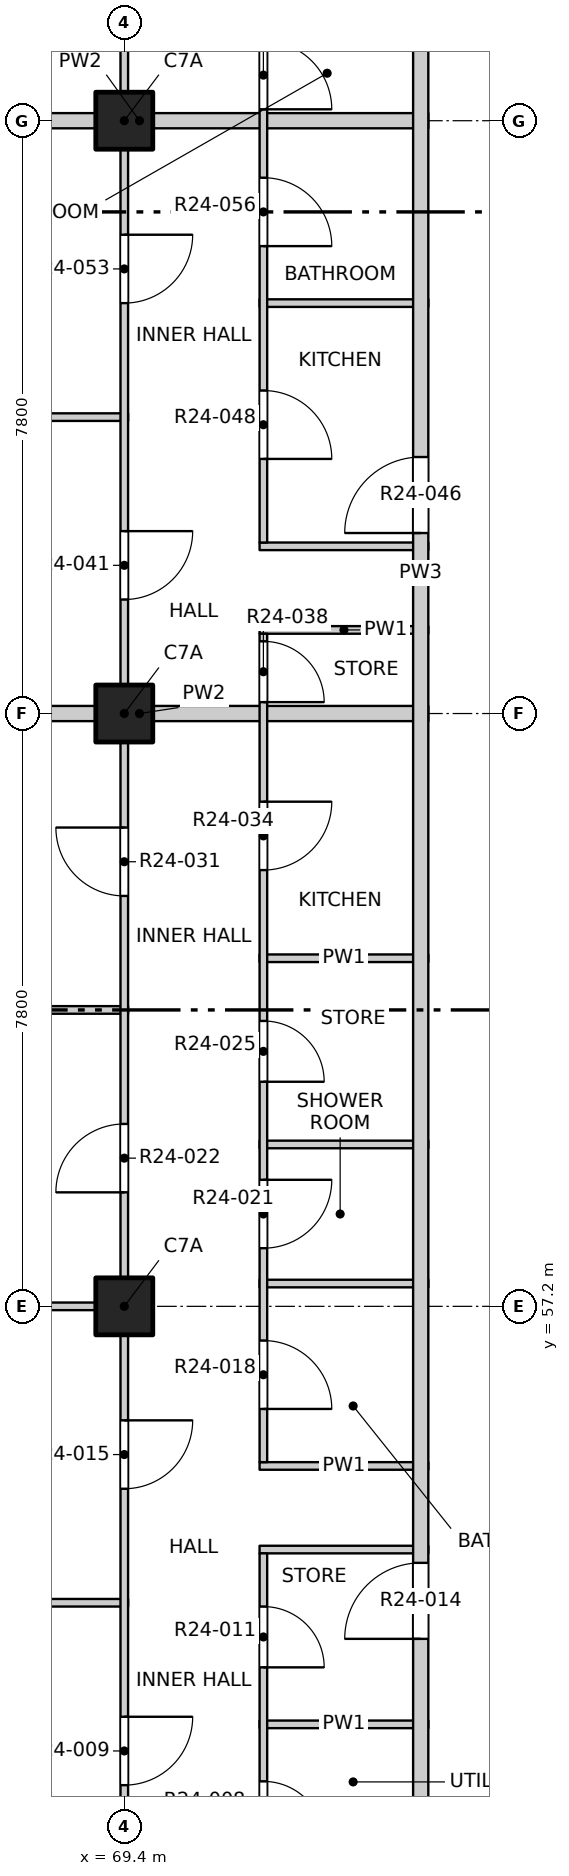
"""IFC4 building model, lengths in metres.
Left out: names, types, materials, properties, quantities, classifications, styles, units other than length and angle.
Written with IfcOpenShell. Run it as: python <this file> out.ifc"""

import sys

from ifc_helpers import new_model, si_unit, direction, frame, frame_2d, origin, origin_2d, place, context, subcontext, project, spatial, rectangle, extrude, element, fill, save


model = new_model("IFC4")
c1 = context("Model", 3, precision=1e-05, world=origin(), true_north=direction((0.0, 1.0)))
c2 = subcontext(c1, "Body", "Model", "MODEL_VIEW")
j1 = project(units=[si_unit("LENGTHUNIT", "METRE"), si_unit("PLANEANGLEUNIT", "RADIAN")], contexts=[c1])
p1 = place(None, origin())
s1 = spatial("IfcSite", under=j1, at=p1, CompositionType="ELEMENT")
p2 = place(p1, origin())
s2 = spatial("IfcBuilding", under=s1, at=p2, CompositionType="ELEMENT")
p3 = place(p2, frame((0.0, 0.0, 249.4)))
s3 = spatial("IfcBuildingStorey", under=s2, at=p3, CompositionType="ELEMENT", Elevation=249.4)
for number, where, z_axis, x_axis in (
    (1, (69.4, 57.2, -0.25), (0.0, 0.0, 1.0), (1.0, 0.0, 0.0)),
    (2, (69.4, 65.0, -0.25), (0.0, 0.0, 1.0), (1.0, 0.0, 0.0)),
    (3, (69.4, 72.8, -0.25), (0.0, 0.0, 1.0), (1.0, 0.0, 0.0)),
):
    element("IfcColumn", number, at=place(p3, frame(where, z_axis=z_axis, x_axis=x_axis)), inside=s3, PredefinedType="COLUMN", context=c2, shape_type="SweptSolid", body=[
        extrude(rectangle(XDim=0.75, YDim=0.75, at=origin_2d()), origin(), (0.0, 0.0, 1.0), 3.4),
    ])
p4 = place(p3, frame((71.18, 51.7, 0.0), z_axis=(0.0, 0.0, 1.0), x_axis=(1.0, 0.0, 0.0)))
e4 = element("IfcWall", 4, at=p4, inside=s3, PredefinedType="PARTITIONING", context=c2, shape_type="SweptSolid", body=[
    extrude(rectangle(XDim=2.22, YDim=0.1, at=frame_2d((1.11, 0.0))), origin(), (0.0, 0.0, 1.0), 3.15),
])
p5 = place(p3, frame((65.8, 53.3, 0.0), z_axis=(0.0, 0.0, 1.0), x_axis=(1.0, 0.0, 0.0)))
e5 = element("IfcWall", 5, at=p5, inside=s3, PredefinedType="PARTITIONING", context=c2, shape_type="SweptSolid", body=[
    extrude(rectangle(XDim=3.65, YDim=0.1, at=frame_2d((1.825, 0.0))), origin(), (0.0, 0.0, 1.0), 3.15),
])
for number, where, z_axis, x_axis in (
    (6, (71.18, 54.0, 0.0), (0.0, 0.0, 1.0), (1.0, 0.0, 0.0)),
    (7, (71.18, 55.1, 0.0), (0.0, 0.0, 1.0), (1.0, 0.0, 0.0)),
):
    element("IfcWall", number, at=place(p3, frame(where, z_axis=z_axis, x_axis=x_axis)), inside=s3, PredefinedType="PARTITIONING", context=c2, shape_type="SweptSolid", body=[
        extrude(rectangle(XDim=2.22, YDim=0.1, at=frame_2d((1.11, 0.0))), origin(), (0.0, 0.0, 1.0), 3.15),
    ])
p6 = place(p3, frame((65.8, 57.2, 0.0), z_axis=(0.0, 0.0, 1.0), x_axis=(1.0, 0.0, 0.0)))
e8 = element("IfcWall", 8, at=p6, inside=s3, PredefinedType="PARTITIONING", context=c2, shape_type="SweptSolid", body=[
    extrude(rectangle(XDim=3.65, YDim=0.1, at=frame_2d((1.825, 0.0))), origin(), (0.0, 0.0, 1.0), 3.15),
])
for number, where, z_axis, x_axis in (
    (9, (71.18, 57.5, 0.0), (0.0, 0.0, 1.0), (1.0, 0.0, 0.0)),
    (10, (71.18, 59.33, 0.0), (0.0, 0.0, 1.0), (1.0, 0.0, 0.0)),
):
    element("IfcWall", number, at=place(p3, frame(where, z_axis=z_axis, x_axis=x_axis)), inside=s3, PredefinedType="PARTITIONING", context=c2, shape_type="SweptSolid", body=[
        extrude(rectangle(XDim=2.22, YDim=0.1, at=frame_2d((1.11, 0.0))), origin(), (0.0, 0.0, 1.0), 3.15),
    ])
p7 = place(p3, frame((65.8, 61.1, 0.0), z_axis=(0.0, 0.0, 1.0), x_axis=(1.0, 0.0, 0.0)))
e11 = element("IfcWall", 11, at=p7, inside=s3, PredefinedType="PARTITIONING", context=c2, shape_type="SweptSolid", body=[
    extrude(rectangle(XDim=3.65, YDim=0.1, at=frame_2d((1.825, 0.0))), origin(), (0.0, 0.0, 1.0), 2.55),
])
p8 = place(p3, frame((71.18, 61.78, 0.0), z_axis=(0.0, 0.0, 1.0), x_axis=(1.0, 0.0, 0.0)))
e12 = element("IfcWall", 12, at=p8, inside=s3, PredefinedType="PARTITIONING", context=c2, shape_type="SweptSolid", body=[
    extrude(rectangle(XDim=2.22, YDim=0.1, at=frame_2d((1.11, 0.0))), origin(), (0.0, 0.0, 1.0), 3.15),
])
p9 = place(p3, frame((65.8, 65.0, 0.0), z_axis=(0.0, 0.0, 1.0), x_axis=(1.0, 0.0, 0.0)))
e13 = element("IfcWall", 13, at=p9, inside=s3, PredefinedType="PARTITIONING", context=c2, shape_type="SweptSolid", body=[
    extrude(rectangle(XDim=7.6, YDim=0.2, at=frame_2d((3.8, 0.0))), origin(), (0.0, 0.0, 1.0), 3.15),
])
for number, where, z_axis, x_axis in (
    (14, (71.18, 66.1, 0.0), (0.0, 0.0, 1.0), (1.0, 0.0, 0.0)),
    (15, (71.18, 67.2, 0.0), (0.0, 0.0, 1.0), (1.0, 0.0, 0.0)),
):
    element("IfcWall", number, at=place(p3, frame(where, z_axis=z_axis, x_axis=x_axis)), inside=s3, PredefinedType="PARTITIONING", context=c2, shape_type="SweptSolid", body=[
        extrude(rectangle(XDim=2.22, YDim=0.1, at=frame_2d((1.11, 0.0))), origin(), (0.0, 0.0, 1.0), 3.15),
    ])
p10 = place(p3, frame((65.8, 68.9, 0.0), z_axis=(0.0, 0.0, 1.0), x_axis=(1.0, 0.0, 0.0)))
e16 = element("IfcWall", 16, at=p10, inside=s3, PredefinedType="PARTITIONING", context=c2, shape_type="SweptSolid", body=[
    extrude(rectangle(XDim=3.65, YDim=0.1, at=frame_2d((1.825, 0.0))), origin(), (0.0, 0.0, 1.0), 2.55),
])
p11 = place(p3, frame((71.18, 70.4, 0.0), z_axis=(0.0, 0.0, 1.0), x_axis=(1.0, 0.0, 0.0)))
e17 = element("IfcWall", 17, at=p11, inside=s3, PredefinedType="PARTITIONING", context=c2, shape_type="SweptSolid", body=[
    extrude(rectangle(XDim=2.22, YDim=0.1, at=frame_2d((1.11, 0.0))), origin(), (0.0, 0.0, 1.0), 3.15),
])
p12 = place(p3, frame((65.8, 72.8, 0.0), z_axis=(0.0, 0.0, 1.0), x_axis=(1.0, 0.0, 0.0)))
e18 = element("IfcWall", 18, at=p12, inside=s3, PredefinedType="PARTITIONING", context=c2, shape_type="SweptSolid", body=[
    extrude(rectangle(XDim=7.6, YDim=0.2, at=frame_2d((3.8, 0.0))), origin(), (0.0, 0.0, 1.0), 3.15),
])
p13 = place(p3, frame((69.4, 45.8, 0.0), z_axis=(0.0, 0.0, 1.0), x_axis=(0.0, 1.0, 0.0)))
e19 = element("IfcWall", 19, at=p13, inside=s3, PredefinedType="PARTITIONING", context=c2, shape_type="SweptSolid", body=[
    extrude(rectangle(XDim=38.4, YDim=0.1, at=frame_2d((19.2, 0.0))), origin(), (0.0, 0.0, 1.0), 3.15),
])
p14 = place(p13, frame((1.05, 0.0, 0.0)))
e20 = element("IfcOpeningElement", 20, at=p14, cuts=e19, PredefinedType="OPENING", context=c2, shape_type="SweptSolid", body=[
    extrude(rectangle(XDim=1.2, YDim=2.1, at=frame_2d((0.6, 1.05))), frame((0.0, 0.06, 0.0), z_axis=(0.0, -1.0, 0.0), x_axis=(1.0, 0.0, 0.0)), (0.0, 0.0, 1.0), 0.12),
])
p15 = place(p13, frame((5.1, 0.0, 0.0)))
e21 = element("IfcOpeningElement", 21, at=p15, cuts=e19, PredefinedType="OPENING", context=c2, shape_type="SweptSolid", body=[
    extrude(rectangle(XDim=0.9, YDim=2.1, at=frame_2d((0.45, 1.05))), frame((0.0, 0.06, 0.0), z_axis=(0.0, -1.0, 0.0), x_axis=(1.0, 0.0, 0.0)), (0.0, 0.0, 1.0), 0.12),
])
p16 = place(p13, frame((9.0, 0.0, 0.0)))
e22 = element("IfcOpeningElement", 22, at=p16, cuts=e19, PredefinedType="OPENING", context=c2, shape_type="SweptSolid", body=[
    extrude(rectangle(XDim=0.9, YDim=2.1, at=frame_2d((0.45, 1.05))), frame((0.0, 0.06, 0.0), z_axis=(0.0, -1.0, 0.0), x_axis=(1.0, 0.0, 0.0)), (0.0, 0.0, 1.0), 0.12),
])
p17 = place(p13, frame((12.9, 0.0, 0.0)))
e23 = element("IfcOpeningElement", 23, at=p17, cuts=e19, PredefinedType="OPENING", context=c2, shape_type="SweptSolid", body=[
    extrude(rectangle(XDim=0.9, YDim=2.1, at=frame_2d((0.45, 1.05))), frame((0.0, 0.06, 0.0), z_axis=(0.0, -1.0, 0.0), x_axis=(1.0, 0.0, 0.0)), (0.0, 0.0, 1.0), 0.12),
])
p18 = place(p13, frame((16.8, 0.0, 0.0)))
e24 = element("IfcOpeningElement", 24, at=p18, cuts=e19, PredefinedType="OPENING", context=c2, shape_type="SweptSolid", body=[
    extrude(rectangle(XDim=0.9, YDim=2.1, at=frame_2d((0.45, 1.05))), frame((0.0, 0.06, 0.0), z_axis=(0.0, -1.0, 0.0), x_axis=(1.0, 0.0, 0.0)), (0.0, 0.0, 1.0), 0.12),
])
p19 = place(p13, frame((20.7, 0.0, 0.0)))
e25 = element("IfcOpeningElement", 25, at=p19, cuts=e19, PredefinedType="OPENING", context=c2, shape_type="SweptSolid", body=[
    extrude(rectangle(XDim=0.9, YDim=2.1, at=frame_2d((0.45, 1.05))), frame((0.0, 0.06, 0.0), z_axis=(0.0, -1.0, 0.0), x_axis=(1.0, 0.0, 0.0)), (0.0, 0.0, 1.0), 0.12),
])
p20 = place(p13, frame((24.6, 0.0, 0.0)))
e26 = element("IfcOpeningElement", 26, at=p20, cuts=e19, PredefinedType="OPENING", context=c2, shape_type="SweptSolid", body=[
    extrude(rectangle(XDim=0.9, YDim=2.1, at=frame_2d((0.45, 1.05))), frame((0.0, 0.06, 0.0), z_axis=(0.0, -1.0, 0.0), x_axis=(1.0, 0.0, 0.0)), (0.0, 0.0, 1.0), 0.12),
])
p21 = place(p13, frame((30.3, 0.0, 0.0)))
e27 = element("IfcOpeningElement", 27, at=p21, cuts=e19, PredefinedType="OPENING", context=c2, shape_type="SweptSolid", body=[
    extrude(rectangle(XDim=1.2, YDim=2.1, at=frame_2d((0.6, 1.05))), frame((0.0, 0.06, 0.0), z_axis=(0.0, -1.0, 0.0), x_axis=(1.0, 0.0, 0.0)), (0.0, 0.0, 1.0), 0.12),
])
p22 = place(p13, frame((36.15, 0.0, 0.0)))
e28 = element("IfcOpeningElement", 28, at=p22, cuts=e19, PredefinedType="OPENING", context=c2, shape_type="SweptSolid", body=[
    extrude(rectangle(XDim=1.2, YDim=2.1, at=frame_2d((0.6, 1.05))), frame((0.0, 0.06, 0.0), z_axis=(0.0, -1.0, 0.0), x_axis=(1.0, 0.0, 0.0)), (0.0, 0.0, 1.0), 0.12),
])
p23 = place(p3, frame((71.23, 49.45, 0.0), z_axis=(0.0, 0.0, 1.0), x_axis=(0.0, 1.0, 0.0)))
e29 = element("IfcWall", 29, at=p23, inside=s3, PredefinedType="PARTITIONING", context=c2, shape_type="SweptSolid", body=[
    extrude(rectangle(XDim=4.5, YDim=0.1, at=frame_2d((2.25, 0.0))), origin(), (0.0, 0.0, 1.0), 3.15),
])
p24 = place(p23, frame((0.7, 0.0, 0.0)))
e30 = element("IfcOpeningElement", 30, at=p24, cuts=e29, PredefinedType="OPENING", context=c2, shape_type="SweptSolid", body=[
    extrude(rectangle(XDim=0.8, YDim=2.1, at=frame_2d((0.4, 1.05))), frame((0.0, 0.06, 0.0), z_axis=(0.0, -1.0, 0.0), x_axis=(1.0, 0.0, 0.0)), (0.0, 0.0, 1.0), 0.12),
])
p25 = place(p23, frame((3.0, 0.0, 0.0)))
e31 = element("IfcOpeningElement", 31, at=p25, cuts=e29, PredefinedType="OPENING", context=c2, shape_type="SweptSolid", body=[
    extrude(rectangle(XDim=0.8, YDim=2.1, at=frame_2d((0.4, 1.05))), frame((0.0, 0.06, 0.0), z_axis=(0.0, -1.0, 0.0), x_axis=(1.0, 0.0, 0.0)), (0.0, 0.0, 1.0), 0.12),
])
p26 = place(p3, frame((71.23, 55.15, 0.0), z_axis=(0.0, 0.0, 1.0), x_axis=(0.0, 1.0, 0.0)))
e32 = element("IfcWall", 32, at=p26, inside=s3, PredefinedType="PARTITIONING", context=c2, shape_type="SweptSolid", body=[
    extrude(rectangle(XDim=10.9, YDim=0.1, at=frame_2d((5.45, 0.0))), origin(), (0.0, 0.0, 1.0), 3.15),
])
p27 = place(p26, frame((0.7, 0.0, 0.0)))
e33 = element("IfcOpeningElement", 33, at=p27, cuts=e32, PredefinedType="OPENING", context=c2, shape_type="SweptSolid", body=[
    extrude(rectangle(XDim=0.9, YDim=2.1, at=frame_2d((0.45, 1.05))), frame((0.0, 0.06, 0.0), z_axis=(0.0, -1.0, 0.0), x_axis=(1.0, 0.0, 0.0)), (0.0, 0.0, 1.0), 0.12),
])
p28 = place(p26, frame((2.815, 0.0, 0.0)))
e34 = element("IfcOpeningElement", 34, at=p28, cuts=e32, PredefinedType="OPENING", context=c2, shape_type="SweptSolid", body=[
    extrude(rectangle(XDim=0.9, YDim=2.1, at=frame_2d((0.45, 1.05))), frame((0.0, 0.06, 0.0), z_axis=(0.0, -1.0, 0.0), x_axis=(1.0, 0.0, 0.0)), (0.0, 0.0, 1.0), 0.12),
])
p29 = place(p26, frame((5.005, 0.0, 0.0)))
e35 = element("IfcOpeningElement", 35, at=p29, cuts=e32, PredefinedType="OPENING", context=c2, shape_type="SweptSolid", body=[
    extrude(rectangle(XDim=0.8, YDim=2.1, at=frame_2d((0.4, 1.05))), frame((0.0, 0.06, 0.0), z_axis=(0.0, -1.0, 0.0), x_axis=(1.0, 0.0, 0.0)), (0.0, 0.0, 1.0), 0.12),
])
p30 = place(p26, frame((7.79, 0.0, 0.0)))
e36 = element("IfcOpeningElement", 36, at=p30, cuts=e32, PredefinedType="OPENING", context=c2, shape_type="SweptSolid", body=[
    extrude(rectangle(XDim=0.9, YDim=2.1, at=frame_2d((0.45, 1.05))), frame((0.0, 0.06, 0.0), z_axis=(0.0, -1.0, 0.0), x_axis=(1.0, 0.0, 0.0)), (0.0, 0.0, 1.0), 0.12),
])
p31 = place(p26, frame((10.0, 0.0, 0.0)))
e37 = element("IfcOpeningElement", 37, at=p31, cuts=e32, PredefinedType="OPENING", context=c2, shape_type="SweptSolid", body=[
    extrude(rectangle(XDim=0.8, YDim=2.1, at=frame_2d((0.4, 1.05))), frame((0.0, 0.06, 0.0), z_axis=(0.0, -1.0, 0.0), x_axis=(1.0, 0.0, 0.0)), (0.0, 0.0, 1.0), 0.12),
])
p32 = place(p3, frame((71.23, 67.25, 0.0), z_axis=(0.0, 0.0, 1.0), x_axis=(0.0, 1.0, 0.0)))
e38 = element("IfcWall", 38, at=p32, inside=s3, PredefinedType="PARTITIONING", context=c2, shape_type="SweptSolid", body=[
    extrude(rectangle(XDim=6.7, YDim=0.1, at=frame_2d((3.35, 0.0))), origin(), (0.0, 0.0, 1.0), 3.15),
])
p33 = place(p32, frame((1.1, 0.0, 0.0)))
e39 = element("IfcOpeningElement", 39, at=p33, cuts=e38, PredefinedType="OPENING", context=c2, shape_type="SweptSolid", body=[
    extrude(rectangle(XDim=0.9, YDim=2.1, at=frame_2d((0.45, 1.05))), frame((0.0, 0.06, 0.0), z_axis=(0.0, -1.0, 0.0), x_axis=(1.0, 0.0, 0.0)), (0.0, 0.0, 1.0), 0.12),
])
p34 = place(p32, frame((3.9, 0.0, 0.0)))
e40 = element("IfcOpeningElement", 40, at=p34, cuts=e38, PredefinedType="OPENING", context=c2, shape_type="SweptSolid", body=[
    extrude(rectangle(XDim=0.9, YDim=2.1, at=frame_2d((0.45, 1.05))), frame((0.0, 0.06, 0.0), z_axis=(0.0, -1.0, 0.0), x_axis=(1.0, 0.0, 0.0)), (0.0, 0.0, 1.0), 0.12),
])
p35 = place(p32, frame((5.7, 0.0, 0.0)))
e41 = element("IfcOpeningElement", 41, at=p35, cuts=e38, PredefinedType="OPENING", context=c2, shape_type="SweptSolid", body=[
    extrude(rectangle(XDim=0.9, YDim=2.1, at=frame_2d((0.45, 1.05))), frame((0.0, 0.06, 0.0), z_axis=(0.0, -1.0, 0.0), x_axis=(1.0, 0.0, 0.0)), (0.0, 0.0, 1.0), 0.12),
])
p36 = place(p3, frame((73.3, 49.5, 0.0), z_axis=(0.0, 0.0, 1.0), x_axis=(0.0, 1.0, 0.0)))
e42 = element("IfcWall", 42, at=p36, inside=s3, PredefinedType="PARTITIONING", context=c2, shape_type="SweptSolid", body=[
    extrude(rectangle(XDim=34.7, YDim=0.2, at=frame_2d((17.35, 0.0))), origin(), (0.0, 0.0, 1.0), 3.15),
])
p37 = place(p36, frame((3.325, 0.0, 0.0)))
e43 = element("IfcOpeningElement", 43, at=p37, cuts=e42, PredefinedType="OPENING", context=c2, shape_type="SweptSolid", body=[
    extrude(rectangle(XDim=1.0, YDim=2.1, at=frame_2d((0.5, 1.05))), frame((0.0, 0.11, 0.0), z_axis=(0.0, -1.0, 0.0), x_axis=(1.0, 0.0, 0.0)), (0.0, 0.0, 1.0), 0.22),
])
p38 = place(p36, frame((17.875, 0.0, 0.0)))
e44 = element("IfcOpeningElement", 44, at=p38, cuts=e42, PredefinedType="OPENING", context=c2, shape_type="SweptSolid", body=[
    extrude(rectangle(XDim=1.0, YDim=2.1, at=frame_2d((0.5, 1.05))), frame((0.0, 0.11, 0.0), z_axis=(0.0, -1.0, 0.0), x_axis=(1.0, 0.0, 0.0)), (0.0, 0.0, 1.0), 0.22),
])
p39 = place(p36, frame((25.775, 0.0, 0.0)))
e45 = element("IfcOpeningElement", 45, at=p39, cuts=e42, PredefinedType="OPENING", context=c2, shape_type="SweptSolid", body=[
    extrude(rectangle(XDim=1.0, YDim=2.1, at=frame_2d((0.5, 1.05))), frame((0.0, 0.11, 0.0), z_axis=(0.0, -1.0, 0.0), x_axis=(1.0, 0.0, 0.0)), (0.0, 0.0, 1.0), 0.22),
])
p40 = place(p24, origin())
e46 = element("IfcDoor", 46, at=p40, inside=s3, OperationType="SINGLE_SWING_RIGHT", PredefinedType="DOOR", context=c2, shape_type="SweptSolid", body=[
    extrude(rectangle(XDim=0.8, YDim=2.1, at=frame_2d((0.4, 1.05))), frame((0.0, 0.025, 0.0), z_axis=(0.0, -1.0, 0.0), x_axis=(1.0, 0.0, 0.0)), (0.0, 0.0, 1.0), 0.05),
])
fill(e30, e46)
p41 = place(p15, origin())
e47 = element("IfcDoor", 47, at=p41, inside=s3, OperationType="SINGLE_SWING_LEFT", PredefinedType="DOOR", context=c2, shape_type="SweptSolid", body=[
    extrude(rectangle(XDim=0.9, YDim=2.1, at=frame_2d((0.45, 1.05))), frame((0.0, 0.025, 0.0), z_axis=(0.0, -1.0, 0.0), x_axis=(1.0, 0.0, 0.0)), (0.0, 0.0, 1.0), 0.05),
])
fill(e21, e47)
p42 = place(p25, origin())
e48 = element("IfcDoor", 48, at=p42, inside=s3, OperationType="SINGLE_SWING_RIGHT", PredefinedType="DOOR", context=c2, shape_type="SweptSolid", body=[
    extrude(rectangle(XDim=0.8, YDim=2.1, at=frame_2d((0.4, 1.05))), frame((0.0, 0.025, 0.0), z_axis=(0.0, -1.0, 0.0), x_axis=(1.0, 0.0, 0.0)), (0.0, 0.0, 1.0), 0.05),
])
fill(e31, e48)
p43 = place(p37, origin())
e49 = element("IfcDoor", 49, at=p43, inside=s3, OperationType="SINGLE_SWING_LEFT", PredefinedType="DOOR", context=c2, shape_type="SweptSolid", body=[
    extrude(rectangle(XDim=1.0, YDim=2.1, at=frame_2d((0.5, 1.05))), frame((0.0, 0.025, 0.0), z_axis=(0.0, -1.0, 0.0), x_axis=(1.0, 0.0, 0.0)), (0.0, 0.0, 1.0), 0.05),
])
fill(e43, e49)
p44 = place(p16, origin())
e50 = element("IfcDoor", 50, at=p44, inside=s3, OperationType="SINGLE_SWING_LEFT", PredefinedType="DOOR", context=c2, shape_type="SweptSolid", body=[
    extrude(rectangle(XDim=0.9, YDim=2.1, at=frame_2d((0.45, 1.05))), frame((0.0, 0.025, 0.0), z_axis=(0.0, -1.0, 0.0), x_axis=(1.0, 0.0, 0.0)), (0.0, 0.0, 1.0), 0.05),
])
fill(e22, e50)
p45 = place(p27, origin())
e51 = element("IfcDoor", 51, at=p45, inside=s3, OperationType="SINGLE_SWING_RIGHT", PredefinedType="DOOR", context=c2, shape_type="SweptSolid", body=[
    extrude(rectangle(XDim=0.9, YDim=2.1, at=frame_2d((0.45, 1.05))), frame((0.0, 0.025, 0.0), z_axis=(0.0, -1.0, 0.0), x_axis=(1.0, 0.0, 0.0)), (0.0, 0.0, 1.0), 0.05),
])
fill(e33, e51)
p46 = place(p28, origin())
e52 = element("IfcDoor", 52, at=p46, inside=s3, OperationType="SINGLE_SWING_LEFT", PredefinedType="DOOR", context=c2, shape_type="SweptSolid", body=[
    extrude(rectangle(XDim=0.9, YDim=2.1, at=frame_2d((0.45, 1.05))), frame((0.0, 0.025, 0.0), z_axis=(0.0, -1.0, 0.0), x_axis=(1.0, 0.0, 0.0)), (0.0, 0.0, 1.0), 0.05),
])
fill(e34, e52)
p47 = place(p17, origin())
e53 = element("IfcDoor", 53, at=p47, inside=s3, OperationType="SINGLE_SWING_LEFT", PredefinedType="DOOR", context=c2, shape_type="SweptSolid", body=[
    extrude(rectangle(XDim=0.9, YDim=2.1, at=frame_2d((0.45, 1.05))), frame((0.0, 0.025, 0.0), z_axis=(0.0, -1.0, 0.0), x_axis=(1.0, 0.0, 0.0)), (0.0, 0.0, 1.0), 0.05),
])
fill(e23, e53)
p48 = place(p29, origin())
e54 = element("IfcDoor", 54, at=p48, inside=s3, OperationType="SINGLE_SWING_RIGHT", PredefinedType="DOOR", context=c2, shape_type="SweptSolid", body=[
    extrude(rectangle(XDim=0.8, YDim=2.1, at=frame_2d((0.4, 1.05))), frame((0.0, 0.025, 0.0), z_axis=(0.0, -1.0, 0.0), x_axis=(1.0, 0.0, 0.0)), (0.0, 0.0, 1.0), 0.05),
])
fill(e35, e54)
p49 = place(p18, origin())
e55 = element("IfcDoor", 55, at=p49, inside=s3, OperationType="SINGLE_SWING_RIGHT", PredefinedType="DOOR", context=c2, shape_type="SweptSolid", body=[
    extrude(rectangle(XDim=0.9, YDim=2.1, at=frame_2d((0.45, 1.05))), frame((0.0, 0.025, 0.0), z_axis=(0.0, -1.0, 0.0), x_axis=(1.0, 0.0, 0.0)), (0.0, 0.0, 1.0), 0.05),
])
fill(e24, e55)
p50 = place(p30, origin())
e56 = element("IfcDoor", 56, at=p50, inside=s3, OperationType="SINGLE_SWING_LEFT", PredefinedType="DOOR", context=c2, shape_type="SweptSolid", body=[
    extrude(rectangle(XDim=0.9, YDim=2.1, at=frame_2d((0.45, 1.05))), frame((0.0, 0.025, 0.0), z_axis=(0.0, -1.0, 0.0), x_axis=(1.0, 0.0, 0.0)), (0.0, 0.0, 1.0), 0.05),
])
fill(e36, e56)
p51 = place(p31, origin())
e57 = element("IfcDoor", 57, at=p51, inside=s3, OperationType="SINGLE_SWING_RIGHT", PredefinedType="DOOR", context=c2, shape_type="SweptSolid", body=[
    extrude(rectangle(XDim=0.8, YDim=2.1, at=frame_2d((0.4, 1.05))), frame((0.0, 0.025, 0.0), z_axis=(0.0, -1.0, 0.0), x_axis=(1.0, 0.0, 0.0)), (0.0, 0.0, 1.0), 0.05),
])
fill(e37, e57)
p52 = place(p19, origin())
e58 = element("IfcDoor", 58, at=p52, inside=s3, OperationType="SINGLE_SWING_LEFT", PredefinedType="DOOR", context=c2, shape_type="SweptSolid", body=[
    extrude(rectangle(XDim=0.9, YDim=2.1, at=frame_2d((0.45, 1.05))), frame((0.0, 0.025, 0.0), z_axis=(0.0, -1.0, 0.0), x_axis=(1.0, 0.0, 0.0)), (0.0, 0.0, 1.0), 0.05),
])
fill(e25, e58)
p53 = place(p38, origin())
e59 = element("IfcDoor", 59, at=p53, inside=s3, OperationType="SINGLE_SWING_RIGHT", PredefinedType="DOOR", context=c2, shape_type="SweptSolid", body=[
    extrude(rectangle(XDim=1.0, YDim=2.1, at=frame_2d((0.5, 1.05))), frame((0.0, 0.025, 0.0), z_axis=(0.0, -1.0, 0.0), x_axis=(1.0, 0.0, 0.0)), (0.0, 0.0, 1.0), 0.05),
])
fill(e44, e59)
p54 = place(p33, origin())
e60 = element("IfcDoor", 60, at=p54, inside=s3, OperationType="SINGLE_SWING_RIGHT", PredefinedType="DOOR", context=c2, shape_type="SweptSolid", body=[
    extrude(rectangle(XDim=0.9, YDim=2.1, at=frame_2d((0.45, 1.05))), frame((0.0, 0.025, 0.0), z_axis=(0.0, -1.0, 0.0), x_axis=(1.0, 0.0, 0.0)), (0.0, 0.0, 1.0), 0.05),
])
fill(e39, e60)
p55 = place(p20, origin())
e61 = element("IfcDoor", 61, at=p55, inside=s3, OperationType="SINGLE_SWING_LEFT", PredefinedType="DOOR", context=c2, shape_type="SweptSolid", body=[
    extrude(rectangle(XDim=0.9, YDim=2.1, at=frame_2d((0.45, 1.05))), frame((0.0, 0.025, 0.0), z_axis=(0.0, -1.0, 0.0), x_axis=(1.0, 0.0, 0.0)), (0.0, 0.0, 1.0), 0.05),
])
fill(e26, e61)
p56 = place(p34, origin())
e62 = element("IfcDoor", 62, at=p56, inside=s3, OperationType="SINGLE_SWING_RIGHT", PredefinedType="DOOR", context=c2, shape_type="SweptSolid", body=[
    extrude(rectangle(XDim=0.9, YDim=2.1, at=frame_2d((0.45, 1.05))), frame((0.0, 0.025, 0.0), z_axis=(0.0, -1.0, 0.0), x_axis=(1.0, 0.0, 0.0)), (0.0, 0.0, 1.0), 0.05),
])
fill(e40, e62)
p57 = place(p35, origin())
e63 = element("IfcDoor", 63, at=p57, inside=s3, OperationType="SINGLE_SWING_RIGHT", PredefinedType="DOOR", context=c2, shape_type="SweptSolid", body=[
    extrude(rectangle(XDim=0.9, YDim=2.1, at=frame_2d((0.45, 1.05))), frame((0.0, 0.025, 0.0), z_axis=(0.0, -1.0, 0.0), x_axis=(1.0, 0.0, 0.0)), (0.0, 0.0, 1.0), 0.05),
])
fill(e41, e63)
save(model, sys.argv[1])
